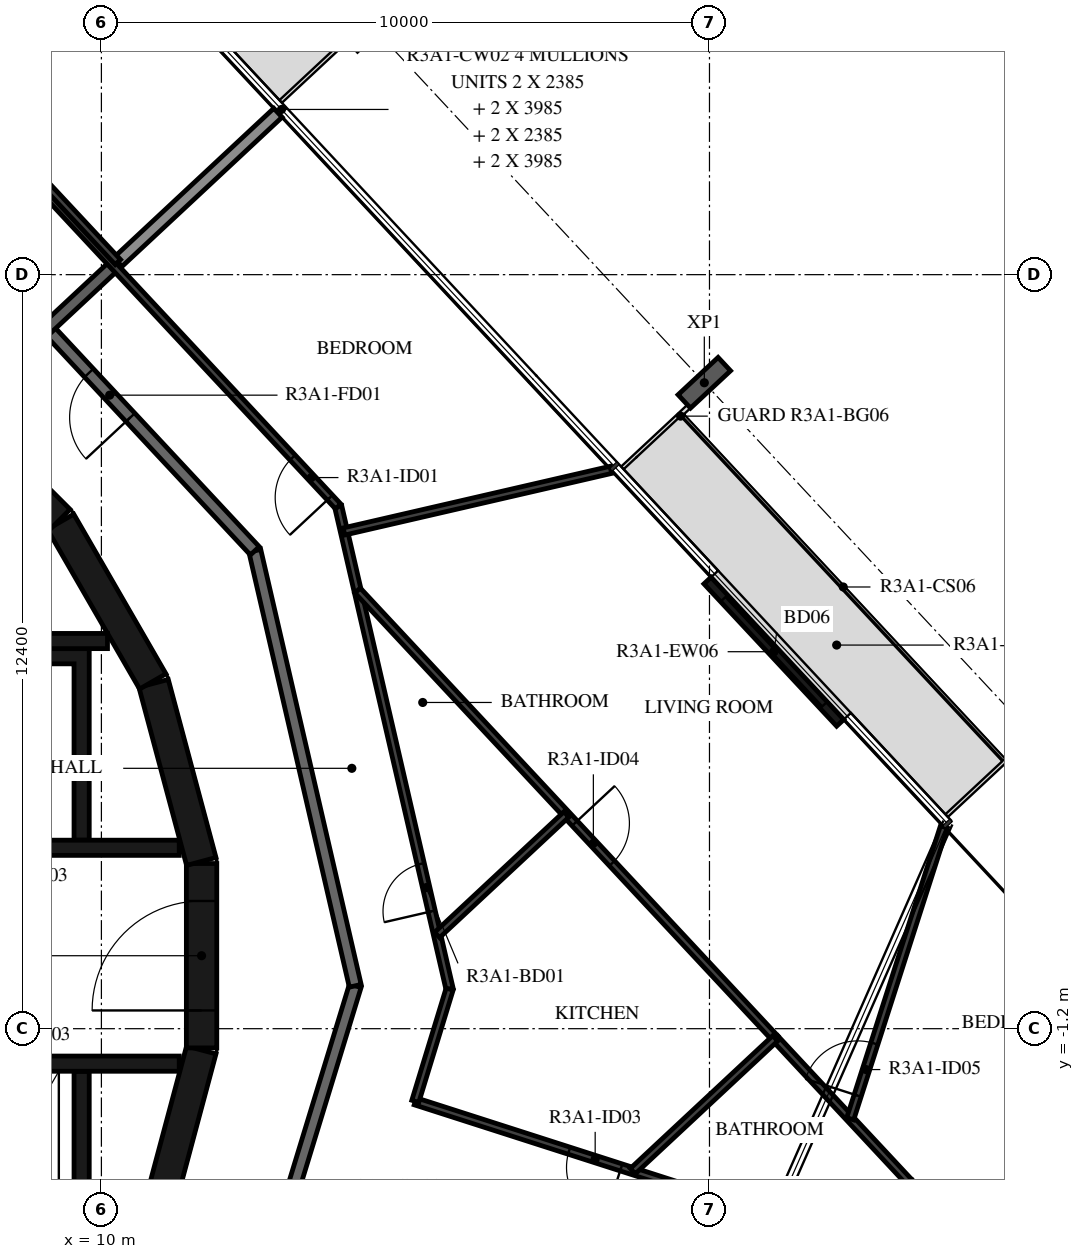
"""IFC4 building model, lengths in metres.
Left out: names, types, materials, properties, quantities, classifications, styles, units other than length and angle.
Written with IfcOpenShell. Run it as: python <this file> out.ifc"""

import sys

from ifc_helpers import new_model, si_unit, direction, frame, frame_2d, origin, origin_2d, place, context, subcontext, project, spatial, polyline, rectangle, i_section, outline, extrude, element, fill, save


model = new_model("IFC4")
c1 = context("Model", 3, precision=1e-05, world=origin(), true_north=direction((0.0, 1.0)))
c2 = subcontext(c1, "Body", "Model", "MODEL_VIEW")
j1 = project(units=[si_unit("LENGTHUNIT", "METRE"), si_unit("PLANEANGLEUNIT", "RADIAN")], contexts=[c1])
p1 = place(None, origin())
s1 = spatial("IfcSite", under=j1, at=p1, CompositionType="ELEMENT")
p2 = place(p1, origin())
s2 = spatial("IfcBuilding", under=s1, at=p2, CompositionType="ELEMENT")
p3 = place(p2, frame((0.0, 0.0, 116.9)))
s3 = spatial("IfcBuildingStorey", under=s2, at=p3, CompositionType="ELEMENT", Elevation=116.9)
p4 = place(p3, frame((19.915, 9.422, -0.38), z_axis=(0.0, 0.0, 1.0), x_axis=(0.68199801865, -0.731354019992, 0.0)))
e1 = element("IfcColumn", 1, at=p4, inside=s3, PredefinedType="COLUMN", context=c2, shape_type="SweptSolid", body=[
    extrude(i_section(OverallWidth=0.3, OverallDepth=0.9, WebThickness=0.019, FlangeThickness=0.035, FilletRadius=0.03, at=origin_2d()), origin(), (0.0, 0.0, 1.0), 3.5),
])
p5 = place(p3, frame((22.15, 3.829, 0.0), z_axis=(0.0, 0.0, 1.0), x_axis=(-0.682035508355, 0.731319058512, 0.0)))
e2 = element("IfcWall", 2, at=p5, inside=s3, PredefinedType="STANDARD", context=c2, shape_type="SweptSolid", body=[
    extrude(rectangle(XDim=3.2, YDim=0.16, at=frame_2d((1.6, 0.0))), origin(), (0.0, 0.0, 1.0), 3.12),
])
p6 = place(p5, frame((0.4, 0.0, 0.0)))
e3 = element("IfcOpeningElement", 3, at=p6, cuts=e2, PredefinedType="OPENING", context=c2, shape_type="SweptSolid", body=[
    extrude(rectangle(XDim=2.4, YDim=2.4, at=frame_2d((1.2, 1.2))), frame((0.0, 0.09, 0.0), z_axis=(0.0, -1.0, 0.0), x_axis=(1.0, 0.0, 0.0)), (0.0, 0.0, 1.0), 0.18),
])
p7 = place(p3, frame((10.858, -4.479, 0.0), z_axis=(0.0, 0.0, 1.0), x_axis=(0.258734743916, 0.965948410781, 0.0)))
e4 = element("IfcWall", 4, at=p7, inside=s3, PredefinedType="SHEAR", context=c2, shape_type="SweptSolid", body=[
    extrude(rectangle(XDim=3.033, YDim=0.5, at=frame_2d((1.516, 0.0))), origin(), (0.0, 0.0, 1.0), 3.12),
])
p8 = place(p3, frame((11.647, -1.516, 0.0), z_axis=(0.0, 0.0, 1.0), x_axis=(0.0, 1.0, 0.0)))
e5 = element("IfcWall", 5, at=p8, inside=s3, PredefinedType="SHEAR", context=c2, shape_type="SweptSolid", body=[
    extrude(rectangle(XDim=3.033, YDim=0.5, at=frame_2d((1.516, 0.0))), origin(), (0.0, 0.0, 1.0), 3.12),
])
p9 = place(p8, frame((0.616, 0.0, 0.0)))
e6 = element("IfcOpeningElement", 6, at=p9, cuts=e5, PredefinedType="OPENING", context=c2, shape_type="SweptSolid", body=[
    extrude(rectangle(XDim=1.8, YDim=2.1, at=frame_2d((0.9, 1.05))), frame((0.0, 0.26, 0.0), z_axis=(0.0, -1.0, 0.0), x_axis=(1.0, 0.0, 0.0)), (0.0, 0.0, 1.0), 0.52),
])
for number, where, z_axis, x_axis in (
    (7, (11.643, 1.55, 0.0), (0.0, 0.0, 1.0), (-0.259, 0.966, 0.0)),
    (8, (10.845, 4.51, 0.0), (0.0, 0.0, 1.0), (-0.5, 0.866, 0.0)),
):
    element("IfcWall", number, at=place(p3, frame(where, z_axis=z_axis, x_axis=x_axis)), inside=s3, PredefinedType="SHEAR", context=c2, shape_type="SweptSolid", body=[
        extrude(rectangle(XDim=3.033, YDim=0.5, at=frame_2d((1.516, 0.0))), origin(), (0.0, 0.0, 1.0), 3.12),
    ])
p10 = place(p3, frame((9.308, 7.164, 0.0), z_axis=(0.0, 0.0, 1.0), x_axis=(-0.707106781187, 0.707106781187, 0.0)))
e9 = element("IfcWall", 9, at=p10, inside=s3, PredefinedType="SHEAR", context=c2, shape_type="SweptSolid", body=[
    extrude(rectangle(XDim=3.032, YDim=0.5, at=frame_2d((1.516, 0.0))), origin(), (0.0, 0.0, 1.0), 3.12),
])
p11 = place(p10, frame((0.416, 0.0, 0.0)))
e10 = element("IfcOpeningElement", 10, at=p11, cuts=e9, PredefinedType="OPENING", context=c2, shape_type="SweptSolid", body=[
    extrude(rectangle(XDim=1.2, YDim=2.1, at=frame_2d((0.6, 1.05))), frame((0.0, 0.26, 0.0), z_axis=(0.0, -1.0, 0.0), x_axis=(1.0, 0.0, 0.0)), (0.0, 0.0, 1.0), 0.52),
])
p12 = place(p3, frame((7.0, 5.175, 0.0), z_axis=(0.0, 0.0, 1.0), x_axis=(1.0, 0.0, 0.0)))
e11 = element("IfcWall", 11, at=p12, inside=s3, PredefinedType="SHEAR", context=c2, shape_type="SweptSolid", body=[
    extrude(rectangle(XDim=3.1, YDim=0.25, at=frame_2d((1.55, 0.0))), origin(), (0.0, 0.0, 1.0), 3.12),
])
p13 = place(p3, origin())
e12 = element("IfcWall", 12, at=p13, inside=s3, PredefinedType="SHEAR", context=c2, shape_type="SweptSolid", body=[
    extrude(outline(polyline([(-9.55, 4.8), (-7.65, 4.8), (-7.65, 1.9), (-7.4, 1.9), (-7.4, 4.8), (-5.5, 4.8), (-5.5, 1.9), (-5.25, 1.9), (-5.25, 4.8), (-3.35, 4.8), (-3.35, 1.9), (-3.1, 1.9), (-3.1, 4.8), (-1.2, 4.8), (-1.2, 1.9), (-0.95, 1.9), (-0.95, 4.8), (0.95, 4.8), (0.95, 1.9), (1.2, 1.9), (1.2, 4.8), (3.1, 4.8), (3.1, 1.9), (3.35, 1.9), (3.35, 4.8), (5.25, 4.8), (5.25, 1.9), (5.5, 1.9), (5.5, 4.8), (7.4, 4.8), (7.4, 1.9), (7.65, 1.9), (7.65, 4.8), (9.55, 4.8), (9.55, 1.9), (9.8, 1.9), (9.8, 4.8), (9.8, 5.05), (-9.8, 5.05), (-9.8, 4.8), (-9.8, 1.9), (-9.55, 1.9), (-9.55, 4.8)])), origin(), (0.0, 0.0, 1.0), 3.12),
])
p14 = place(p3, origin())
e13 = element("IfcWall", 13, at=p14, inside=s3, PredefinedType="SHEAR", context=c2, shape_type="SweptSolid", body=[
    extrude(outline(polyline([(9.8, -5.05), (9.8, -4.8), (9.8, -1.9), (9.55, -1.9), (9.55, -4.8), (7.65, -4.8), (7.65, -1.9), (7.4, -1.9), (7.4, -4.8), (5.5, -4.8), (5.5, -1.9), (5.25, -1.9), (5.25, -4.8), (3.35, -4.8), (3.35, -1.9), (3.1, -1.9), (3.1, -4.8), (1.2, -4.8), (1.2, -1.9), (0.95, -1.9), (0.95, -4.8), (-0.95, -4.8), (-0.95, -1.9), (-1.2, -1.9), (-1.2, -4.8), (-5.25, -4.8), (-5.25, -1.9), (-5.5, -1.9), (-5.5, -4.8), (-7.4, -4.8), (-7.4, -1.9), (-7.65, -1.9), (-7.65, -4.8), (-9.55, -4.8), (-9.55, -1.9), (-9.8, -1.9), (-9.8, -4.8), (-9.8, -5.05), (9.8, -5.05)])), origin(), (0.0, 0.0, 1.0), 3.12),
])
p15 = place(p3, frame((3.35, 1.775, 0.0), z_axis=(0.0, 0.0, 1.0), x_axis=(1.0, 0.0, 0.0)))
e14 = element("IfcWall", 14, at=p15, inside=s3, PredefinedType="SHEAR", context=c2, shape_type="SweptSolid", body=[
    extrude(rectangle(XDim=7.93, YDim=0.25, at=frame_2d((3.965, 0.0))), origin(), (0.0, 0.0, 1.0), 3.12),
])
p16 = place(p15, frame((0.35, 0.0, 0.0)))
e15 = element("IfcOpeningElement", 15, at=p16, cuts=e14, PredefinedType="OPENING", context=c2, shape_type="SweptSolid", body=[
    extrude(rectangle(XDim=1.2, YDim=2.4, at=frame_2d((0.6, 1.2))), frame((0.0, 0.135, 0.0), z_axis=(0.0, -1.0, 0.0), x_axis=(1.0, 0.0, 0.0)), (0.0, 0.0, 1.0), 0.27),
])
p17 = place(p15, frame((2.5, 0.0, 0.0)))
e16 = element("IfcOpeningElement", 16, at=p17, cuts=e14, PredefinedType="OPENING", context=c2, shape_type="SweptSolid", body=[
    extrude(rectangle(XDim=1.2, YDim=2.4, at=frame_2d((0.6, 1.2))), frame((0.0, 0.135, 0.0), z_axis=(0.0, -1.0, 0.0), x_axis=(1.0, 0.0, 0.0)), (0.0, 0.0, 1.0), 0.27),
])
p18 = place(p15, frame((4.8, 0.0, 0.0)))
e17 = element("IfcOpeningElement", 17, at=p18, cuts=e14, PredefinedType="OPENING", context=c2, shape_type="SweptSolid", body=[
    extrude(rectangle(XDim=0.9, YDim=2.1, at=frame_2d((0.45, 1.05))), frame((0.0, 0.135, 0.0), z_axis=(0.0, -1.0, 0.0), x_axis=(1.0, 0.0, 0.0)), (0.0, 0.0, 1.0), 0.27),
])
p19 = place(p3, frame((3.35, -1.775, 0.0), z_axis=(0.0, 0.0, 1.0), x_axis=(1.0, 0.0, 0.0)))
e18 = element("IfcWall", 18, at=p19, inside=s3, PredefinedType="SHEAR", context=c2, shape_type="SweptSolid", body=[
    extrude(rectangle(XDim=7.93, YDim=0.25, at=frame_2d((3.965, 0.0))), origin(), (0.0, 0.0, 1.0), 3.12),
])
p20 = place(p19, frame((0.4, 0.0, 0.0)))
e19 = element("IfcOpeningElement", 19, at=p20, cuts=e18, PredefinedType="OPENING", context=c2, shape_type="SweptSolid", body=[
    extrude(rectangle(XDim=1.1, YDim=2.4, at=frame_2d((0.55, 1.2))), frame((0.0, 0.135, 0.0), z_axis=(0.0, -1.0, 0.0), x_axis=(1.0, 0.0, 0.0)), (0.0, 0.0, 1.0), 0.27),
])
p21 = place(p19, frame((2.55, 0.0, 0.0)))
e20 = element("IfcOpeningElement", 20, at=p21, cuts=e18, PredefinedType="OPENING", context=c2, shape_type="SweptSolid", body=[
    extrude(rectangle(XDim=1.1, YDim=2.4, at=frame_2d((0.55, 1.2))), frame((0.0, 0.135, 0.0), z_axis=(0.0, -1.0, 0.0), x_axis=(1.0, 0.0, 0.0)), (0.0, 0.0, 1.0), 0.27),
])
p22 = place(p19, frame((4.7, 0.0, 0.0)))
e21 = element("IfcOpeningElement", 21, at=p22, cuts=e18, PredefinedType="OPENING", context=c2, shape_type="SweptSolid", body=[
    extrude(rectangle(XDim=1.1, YDim=2.4, at=frame_2d((0.55, 1.2))), frame((0.0, 0.135, 0.0), z_axis=(0.0, -1.0, 0.0), x_axis=(1.0, 0.0, 0.0)), (0.0, 0.0, 1.0), 0.27),
])
p23 = place(p3, frame((12.028, -7.516, 0.0), z_axis=(0.0, 0.0, 1.0), x_axis=(0.292365533182, 0.956306642771, 0.0)))
e22 = element("IfcWall", 22, at=p23, inside=s3, PredefinedType="STANDARD", context=c2, shape_type="SweptSolid", body=[
    extrude(rectangle(XDim=7.342, YDim=0.2, at=frame_2d((3.671, 0.0))), origin(), (0.0, 0.0, 1.0), 3.12),
])
p24 = place(p3, frame((14.175, -0.495, 0.0), z_axis=(0.0, 0.0, 1.0), x_axis=(-0.224922649383, 0.974376622151, 0.0)))
e23 = element("IfcWall", 23, at=p24, inside=s3, PredefinedType="STANDARD", context=c2, shape_type="SweptSolid", body=[
    extrude(rectangle(XDim=7.342, YDim=0.2, at=frame_2d((3.671, 0.0))), origin(), (0.0, 0.0, 1.0), 3.12),
])
p25 = place(p3, frame((12.523, 6.659, 0.0), z_axis=(0.0, 0.0, 1.0), x_axis=(-0.682001841105, 0.731350455479, 0.0)))
e24 = element("IfcWall", 24, at=p25, inside=s3, PredefinedType="STANDARD", context=c2, shape_type="SweptSolid", body=[
    extrude(rectangle(XDim=7.342, YDim=0.2, at=frame_2d((3.671, 0.0))), origin(), (0.0, 0.0, 1.0), 3.12),
])
p26 = place(p25, frame((3.0, 0.0, 0.0)))
e25 = element("IfcOpeningElement", 25, at=p26, cuts=e24, PredefinedType="OPENING", context=c2, shape_type="SweptSolid", body=[
    extrude(rectangle(XDim=1.0, YDim=2.1, at=frame_2d((0.5, 1.05))), frame((0.0, 0.11, 0.0), z_axis=(0.0, -1.0, 0.0), x_axis=(1.0, 0.0, 0.0)), (0.0, 0.0, 1.0), 0.22),
])
p27 = place(p25, frame((5.209, 0.0, 0.0)))
e26 = element("IfcOpeningElement", 26, at=p27, cuts=e24, PredefinedType="OPENING", context=c2, shape_type="SweptSolid", body=[
    extrude(rectangle(XDim=1.0, YDim=2.1, at=frame_2d((0.5, 1.05))), frame((0.0, 0.11, 0.0), z_axis=(0.0, -1.0, 0.0), x_axis=(1.0, 0.0, 0.0)), (0.0, 0.0, 1.0), 0.22),
])
p28 = place(p3, frame((10.233, 11.372, 0.0), z_axis=(0.0, 0.0, 1.0), x_axis=(-0.731329353292, -0.682024469513, 0.0)))
e27 = element("IfcWall", 27, at=p28, inside=s3, PredefinedType="STANDARD", context=c2, shape_type="SweptSolid", body=[
    extrude(rectangle(XDim=1.54, YDim=0.2, at=frame_2d((0.77, 0.0))), origin(), (0.0, 0.0, 1.0), 3.12),
])
p29 = place(p3, frame((12.903, 13.862, 0.0), z_axis=(0.0, 0.0, 1.0), x_axis=(-0.731328084739, -0.682025829769, 0.0)))
e28 = element("IfcWall", 28, at=p29, inside=s3, PredefinedType="STANDARD", context=c2, shape_type="SweptSolid", body=[
    extrude(rectangle(XDim=3.6, YDim=0.2, at=frame_2d((1.8, 0.0))), origin(), (0.0, 0.0, 1.0), 2.73),
])
p30 = place(p3, frame((15.727, -0.549, 0.0), z_axis=(0.0, 0.0, 1.0), x_axis=(-0.22493611855, 0.974373512864, 0.0)))
e29 = element("IfcWall", 29, at=p30, inside=s3, PredefinedType="PARTITIONING", context=c2, shape_type="SweptSolid", body=[
    extrude(rectangle(XDim=8.146, YDim=0.12, at=frame_2d((4.073, 0.0))), origin(), (0.0, 0.0, 1.0), 3.12),
])
p31 = place(p30, frame((1.314, 0.0, 0.0)))
e30 = element("IfcOpeningElement", 30, at=p31, cuts=e29, PredefinedType="OPENING", context=c2, shape_type="SweptSolid", body=[
    extrude(rectangle(XDim=0.8, YDim=2.1, at=frame_2d((0.4, 1.05))), frame((0.0, 0.07, 0.0), z_axis=(0.0, -1.0, 0.0), x_axis=(1.0, 0.0, 0.0)), (0.0, 0.0, 1.0), 0.14),
])
p32 = place(p3, frame((13.894, 7.388, 0.0), z_axis=(0.0, 0.0, 1.0), x_axis=(-0.681994622729, 0.731357186721, 0.0)))
e31 = element("IfcWall", 31, at=p32, inside=s3, PredefinedType="PARTITIONING", context=c2, shape_type="SweptSolid", body=[
    extrude(rectangle(XDim=8.146, YDim=0.12, at=frame_2d((4.073, 0.0))), origin(), (0.0, 0.0, 1.0), 3.12),
])
p33 = place(p32, frame((0.2, 0.0, 0.0)))
e32 = element("IfcOpeningElement", 32, at=p33, cuts=e31, PredefinedType="OPENING", context=c2, shape_type="SweptSolid", body=[
    extrude(rectangle(XDim=0.9, YDim=2.1, at=frame_2d((0.45, 1.05))), frame((0.0, 0.07, 0.0), z_axis=(0.0, -1.0, 0.0), x_axis=(1.0, 0.0, 0.0)), (0.0, 0.0, 1.0), 0.14),
])
p34 = place(p3, frame((25.158, -5.603, 0.0), z_axis=(0.0, 0.0, 1.0), x_axis=(-0.952147783118, 0.305638019729, 0.0)))
e33 = element("IfcWall", 33, at=p34, inside=s3, PredefinedType="PARTITIONING", context=c2, shape_type="SweptSolid", body=[
    extrude(rectangle(XDim=10.498, YDim=0.12, at=frame_2d((5.249, 0.0))), origin(), (0.0, 0.0, 1.0), 3.12),
])
p35 = place(p34, frame((5.373, 0.0, 0.0)))
e34 = element("IfcOpeningElement", 34, at=p35, cuts=e33, PredefinedType="OPENING", context=c2, shape_type="SweptSolid", body=[
    extrude(rectangle(XDim=0.8, YDim=2.1, at=frame_2d((0.4, 1.05))), frame((0.0, 0.07, 0.0), z_axis=(0.0, -1.0, 0.0), x_axis=(1.0, 0.0, 0.0)), (0.0, 0.0, 1.0), 0.14),
])
p36 = place(p34, frame((6.941, 0.0, 0.0)))
e35 = element("IfcOpeningElement", 35, at=p36, cuts=e33, PredefinedType="OPENING", context=c2, shape_type="SweptSolid", body=[
    extrude(rectangle(XDim=0.9, YDim=2.1, at=frame_2d((0.45, 1.05))), frame((0.0, 0.07, 0.0), z_axis=(0.0, -1.0, 0.0), x_axis=(1.0, 0.0, 0.0)), (0.0, 0.0, 1.0), 0.14),
])
p37 = place(p3, frame((15.162, -2.395, 0.0), z_axis=(0.0, 0.0, 1.0), x_axis=(0.292404972776, 0.956294584266, 0.0)))
e36 = element("IfcWall", 36, at=p37, inside=s3, PredefinedType="PARTITIONING", context=c2, shape_type="SweptSolid", body=[
    extrude(rectangle(XDim=1.929, YDim=0.12, at=frame_2d((0.965, 0.0))), origin(), (0.0, 0.0, 1.0), 3.12),
])
p38 = place(p3, frame((14.213, 6.006, 0.0), z_axis=(0.0, 0.0, 1.0), x_axis=(0.681982148724, -0.731368818601, 0.0)))
e37 = element("IfcWall", 37, at=p38, inside=s3, PredefinedType="PARTITIONING", context=c2, shape_type="SweptSolid", body=[
    extrude(rectangle(XDim=10.07, YDim=0.12, at=frame_2d((5.035, 0.0))), origin(), (0.0, 0.0, 1.0), 3.12),
])
p39 = place(p38, frame((5.235, 0.0, 0.0)))
e38 = element("IfcOpeningElement", 38, at=p39, cuts=e37, PredefinedType="OPENING", context=c2, shape_type="SweptSolid", body=[
    extrude(rectangle(XDim=0.9, YDim=2.1, at=frame_2d((0.45, 1.05))), frame((0.0, 0.07, 0.0), z_axis=(0.0, -1.0, 0.0), x_axis=(1.0, 0.0, 0.0)), (0.0, 0.0, 1.0), 0.14),
])
p40 = place(p3, frame((18.379, 7.99, 0.0), z_axis=(0.0, 0.0, 1.0), x_axis=(-0.974372926515, -0.224938658471, 0.0)))
e39 = element("IfcWall", 39, at=p40, inside=s3, PredefinedType="PARTITIONING", context=c2, shape_type="SweptSolid", body=[
    extrude(rectangle(XDim=4.505, YDim=0.12, at=frame_2d((2.253, 0.0))), origin(), (0.0, 0.0, 1.0), 3.12),
])
p41 = place(p3, frame((21.081, -1.359, 0.0), z_axis=(0.0, 0.0, 1.0), x_axis=(0.682046729342, -0.731308593545, 0.0)))
e40 = element("IfcWall", 40, at=p41, inside=s3, PredefinedType="PARTITIONING", context=c2, shape_type="SweptSolid", body=[
    extrude(rectangle(XDim=3.236, YDim=0.12, at=frame_2d((1.618, 0.0))), origin(), (0.0, 0.0, 1.0), 3.12),
])
p42 = place(p3, frame((22.314, -2.681, 0.0), z_axis=(0.0, 0.0, 1.0), x_axis=(0.305629733216, 0.952150443036, 0.0)))
e41 = element("IfcWall", 41, at=p42, inside=s3, PredefinedType="PARTITIONING", context=c2, shape_type="SweptSolid", body=[
    extrude(rectangle(XDim=5.041, YDim=0.12, at=frame_2d((2.52, 0.0))), origin(), (0.0, 0.0, 1.0), 3.12),
])
p43 = place(p42, frame((0.4, 0.0, 0.0)))
e42 = element("IfcOpeningElement", 42, at=p43, cuts=e41, PredefinedType="OPENING", context=c2, shape_type="SweptSolid", body=[
    extrude(rectangle(XDim=0.9, YDim=2.1, at=frame_2d((0.45, 1.05))), frame((0.0, 0.07, 0.0), z_axis=(0.0, -1.0, 0.0), x_axis=(1.0, 0.0, 0.0)), (0.0, 0.0, 1.0), 0.14),
])
p44 = place(p3, frame((15.521, 0.341, 0.0), z_axis=(0.0, 0.0, 1.0), x_axis=(0.73140706136, 0.681941134257, 0.0)))
e43 = element("IfcWall", 43, at=p44, inside=s3, PredefinedType="PARTITIONING", context=c2, shape_type="SweptSolid", body=[
    extrude(rectangle(XDim=2.907, YDim=0.12, at=frame_2d((1.454, 0.0))), origin(), (0.0, 0.0, 1.0), 3.12),
])
p45 = place(p3, frame((21.081, -1.359, 0.0), z_axis=(0.0, 0.0, 1.0), x_axis=(-0.731341711004, -0.682011218196, 0.0)))
e44 = element("IfcWall", 44, at=p45, inside=s3, PredefinedType="PARTITIONING", context=c2, shape_type="SweptSolid", body=[
    extrude(rectangle(XDim=3.202, YDim=0.12, at=frame_2d((1.601, 0.0))), origin(), (0.0, 0.0, 1.0), 3.12),
])
p46 = place(p3, frame((-1.539, 24.071, 0.0), z_axis=(0.0, 0.0, 1.0), x_axis=(0.68200220595, -0.731350115252, 0.0)))
e45 = element("IfcWall", 45, at=p46, inside=s3, PredefinedType="PARTITIONING", context=c2, shape_type="SweptSolid", body=[
    extrude(rectangle(XDim=17.316, YDim=0.12, at=frame_2d((8.658, 0.0))), origin(), (0.0, 0.0, 1.0), 3.12),
])
p47 = place(p46, frame((3.323, 0.0, 0.0)))
e46 = element("IfcOpeningElement", 46, at=p47, cuts=e45, PredefinedType="OPENING", context=c2, shape_type="SweptSolid", body=[
    extrude(rectangle(XDim=0.9, YDim=2.1, at=frame_2d((0.45, 1.05))), frame((0.0, 0.07, 0.0), z_axis=(0.0, -1.0, 0.0), x_axis=(1.0, 0.0, 0.0)), (0.0, 0.0, 1.0), 0.14),
])
p48 = place(p46, frame((1.417, 0.0, 0.0)))
e47 = element("IfcOpeningElement", 47, at=p48, cuts=e45, PredefinedType="OPENING", context=c2, shape_type="SweptSolid", body=[
    extrude(rectangle(XDim=0.9, YDim=2.1, at=frame_2d((0.45, 1.05))), frame((0.0, 0.07, 0.0), z_axis=(0.0, -1.0, 0.0), x_axis=(1.0, 0.0, 0.0)), (0.0, 0.0, 1.0), 0.14),
])
p49 = place(p6, origin())
e48 = element("IfcDoor", 48, at=p49, inside=s3, OperationType="DOUBLE_DOOR_SLIDING", PredefinedType="DOOR", context=c2, shape_type="SweptSolid", body=[
    extrude(rectangle(XDim=2.4, YDim=2.4, at=frame_2d((1.2, 1.2))), frame((0.0, 0.025, 0.0), z_axis=(0.0, -1.0, 0.0), x_axis=(1.0, 0.0, 0.0)), (0.0, 0.0, 1.0), 0.05),
])
fill(e3, e48)
p50 = place(p9, origin())
e49 = element("IfcDoor", 49, at=p50, inside=s3, OperationType="DOUBLE_DOOR_SINGLE_SWING", PredefinedType="DOOR", context=c2, shape_type="SweptSolid", body=[
    extrude(rectangle(XDim=1.8, YDim=2.1, at=frame_2d((0.9, 1.05))), frame((0.0, 0.025, 0.0), z_axis=(0.0, -1.0, 0.0), x_axis=(1.0, 0.0, 0.0)), (0.0, 0.0, 1.0), 0.05),
])
fill(e6, e49)
p51 = place(p26, origin())
e50 = element("IfcDoor", 50, at=p51, inside=s3, OperationType="SINGLE_SWING_LEFT", PredefinedType="DOOR", context=c2, shape_type="SweptSolid", body=[
    extrude(rectangle(XDim=1.0, YDim=2.1, at=frame_2d((0.5, 1.05))), frame((0.0, 0.025, 0.0), z_axis=(0.0, -1.0, 0.0), x_axis=(1.0, 0.0, 0.0)), (0.0, 0.0, 1.0), 0.05),
])
fill(e25, e50)
p52 = place(p31, origin())
e51 = element("IfcDoor", 51, at=p52, inside=s3, OperationType="SINGLE_SWING_LEFT", PredefinedType="DOOR", context=c2, shape_type="SweptSolid", body=[
    extrude(rectangle(XDim=0.8, YDim=2.1, at=frame_2d((0.4, 1.05))), frame((0.0, 0.025, 0.0), z_axis=(0.0, -1.0, 0.0), x_axis=(1.0, 0.0, 0.0)), (0.0, 0.0, 1.0), 0.05),
])
fill(e30, e51)
p53 = place(p33, origin())
e52 = element("IfcDoor", 52, at=p53, inside=s3, OperationType="SINGLE_SWING_LEFT", PredefinedType="DOOR", context=c2, shape_type="SweptSolid", body=[
    extrude(rectangle(XDim=0.9, YDim=2.1, at=frame_2d((0.45, 1.05))), frame((0.0, 0.025, 0.0), z_axis=(0.0, -1.0, 0.0), x_axis=(1.0, 0.0, 0.0)), (0.0, 0.0, 1.0), 0.05),
])
fill(e32, e52)
p54 = place(p36, origin())
e53 = element("IfcDoor", 53, at=p54, inside=s3, OperationType="SINGLE_SWING_LEFT", PredefinedType="DOOR", context=c2, shape_type="SweptSolid", body=[
    extrude(rectangle(XDim=0.9, YDim=2.1, at=frame_2d((0.45, 1.05))), frame((0.0, 0.025, 0.0), z_axis=(0.0, -1.0, 0.0), x_axis=(1.0, 0.0, 0.0)), (0.0, 0.0, 1.0), 0.05),
])
fill(e35, e53)
p55 = place(p39, origin())
e54 = element("IfcDoor", 54, at=p55, inside=s3, OperationType="SINGLE_SWING_LEFT", PredefinedType="DOOR", context=c2, shape_type="SweptSolid", body=[
    extrude(rectangle(XDim=0.9, YDim=2.1, at=frame_2d((0.45, 1.05))), frame((0.0, 0.025, 0.0), z_axis=(0.0, -1.0, 0.0), x_axis=(1.0, 0.0, 0.0)), (0.0, 0.0, 1.0), 0.05),
])
fill(e38, e54)
p56 = place(p43, origin())
e55 = element("IfcDoor", 55, at=p56, inside=s3, OperationType="SINGLE_SWING_LEFT", PredefinedType="DOOR", context=c2, shape_type="SweptSolid", body=[
    extrude(rectangle(XDim=0.9, YDim=2.1, at=frame_2d((0.45, 1.05))), frame((0.0, 0.025, 0.0), z_axis=(0.0, -1.0, 0.0), x_axis=(1.0, 0.0, 0.0)), (0.0, 0.0, 1.0), 0.05),
])
fill(e42, e55)
save(model, sys.argv[1])
